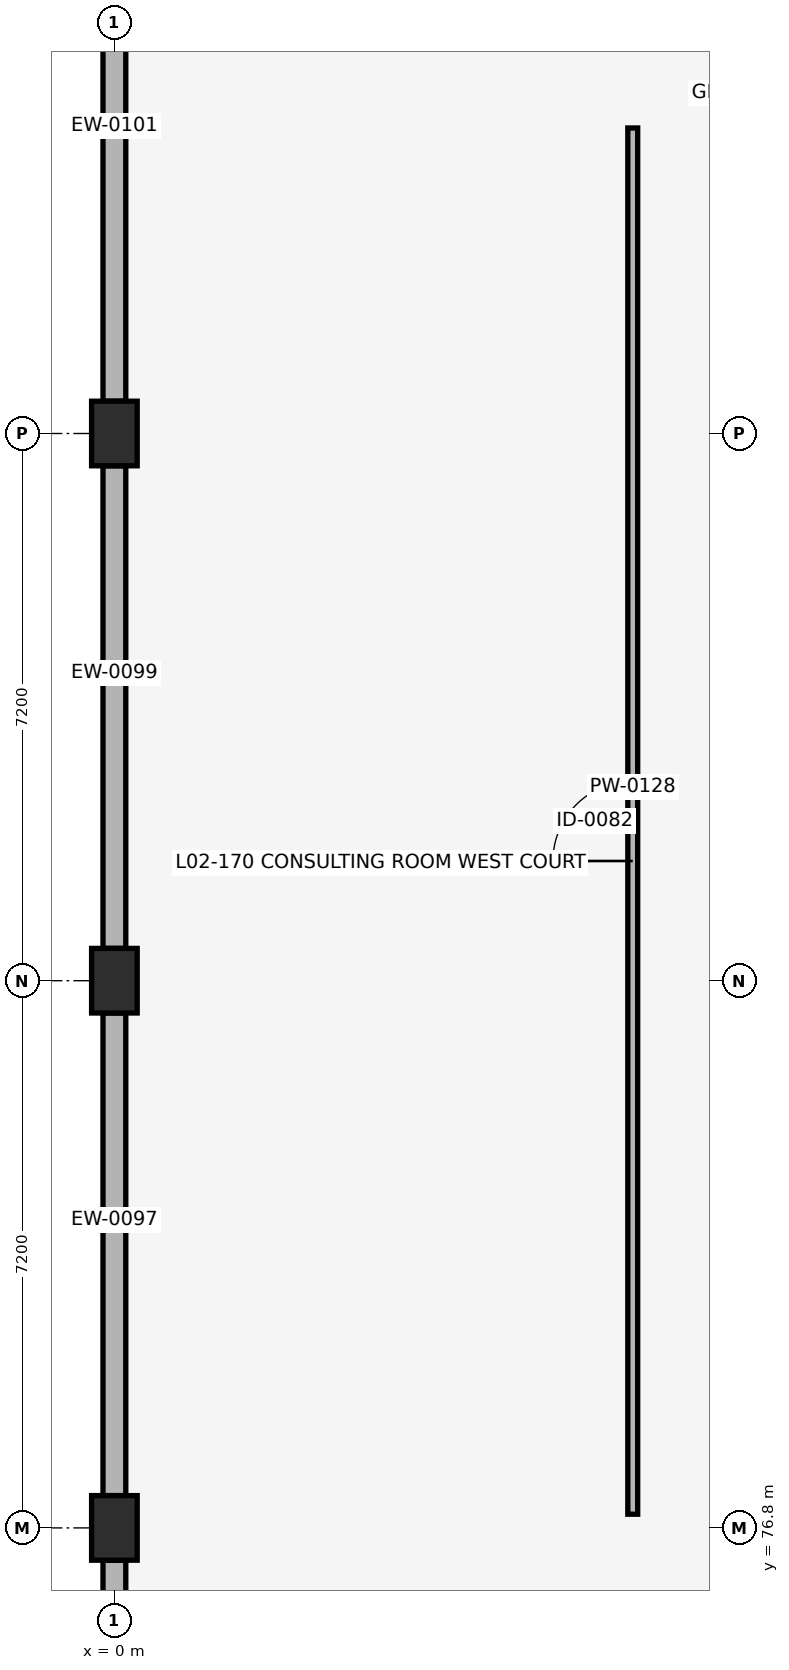
"""IFC4 building model, lengths in metres.
Left out: names, types, materials, properties, quantities, classifications, styles, units other than length and angle.
Written with IfcOpenShell. Run it as: python <this file> out.ifc"""

import sys

from ifc_helpers import new_model, si_unit, direction, frame, frame_2d, origin, origin_2d, place, context, subcontext, project, spatial, rectangle, extrude, element, fill, save


model = new_model("IFC4")
c1 = context("Model", 3, precision=1e-05, world=origin(), true_north=direction((0.0, 1.0)))
c2 = subcontext(c1, "Body", "Model", "MODEL_VIEW")
j1 = project(units=[si_unit("LENGTHUNIT", "METRE"), si_unit("PLANEANGLEUNIT", "RADIAN")], contexts=[c1])
p1 = place(None, origin())
s1 = spatial("IfcSite", under=j1, at=p1, CompositionType="ELEMENT")
p2 = place(p1, origin())
s2 = spatial("IfcBuilding", under=s1, at=p2, CompositionType="ELEMENT")
p3 = place(p2, frame((0.0, 0.0, 8.5)))
s3 = spatial("IfcBuildingStorey", under=s2, at=p3, CompositionType="ELEMENT", Elevation=8.5)
for number, where, z_axis, x_axis in (
    (1, (0.0, 76.8, 0.0), (0.0, 0.0, 1.0), (1.0, 0.0, 0.0)),
    (2, (0.0, 84.0, 0.0), (0.0, 0.0, 1.0), (1.0, 0.0, 0.0)),
    (3, (0.0, 91.2, 0.0), (0.0, 0.0, 1.0), (1.0, 0.0, 0.0)),
):
    element("IfcColumn", number, at=place(p3, frame(where, z_axis=z_axis, x_axis=x_axis)), inside=s3, PredefinedType="COLUMN", context=c2, shape_type="SweptSolid", body=[
        extrude(rectangle(XDim=0.6, YDim=0.85, at=origin_2d()), origin(), (0.0, 0.0, 1.0), 4.08),
    ])
p4 = place(p3, frame((0.0, 76.375, 0.0), z_axis=(0.0, 0.0, 1.0), x_axis=(0.0, -1.0, 0.0)))
e4 = element("IfcWall", 4, at=p4, inside=s3, PredefinedType="SOLIDWALL", context=c2, shape_type="SweptSolid", body=[
    extrude(rectangle(XDim=6.35, YDim=0.3, at=frame_2d((3.175, 0.0))), origin(), (0.0, 0.0, 1.0), 3.08),
])
for number, where, z_axis, x_axis in (
    (5, (0.0, 83.575, 0.0), (0.0, 0.0, 1.0), (0.0, -1.0, 0.0)),
    (6, (0.0, 90.775, 0.0), (0.0, 0.0, 1.0), (0.0, -1.0, 0.0)),
):
    element("IfcWall", number, at=place(p3, frame(where, z_axis=z_axis, x_axis=x_axis)), inside=s3, PredefinedType="SOLIDWALL", context=c2, shape_type="SweptSolid", body=[
        extrude(rectangle(XDim=6.35, YDim=0.3, at=frame_2d((3.175, 0.0))), origin(), (0.0, 0.0, 1.0), 3.08),
    ])
p5 = place(p3, frame((0.0, 97.975, 0.0), z_axis=(0.0, 0.0, 1.0), x_axis=(0.0, -1.0, 0.0)))
e7 = element("IfcWall", 7, at=p5, inside=s3, PredefinedType="SOLIDWALL", context=c2, shape_type="SweptSolid", body=[
    extrude(rectangle(XDim=6.35, YDim=0.3, at=frame_2d((3.175, 0.0))), origin(), (0.0, 0.0, 1.0), 3.08),
])
p6 = place(p3, frame((6.82, 76.98, 0.0), z_axis=(0.0, 0.0, 1.0), x_axis=(0.0, 1.0, 0.0)))
e8 = element("IfcWall", 8, at=p6, inside=s3, PredefinedType="PARTITIONING", context=c2, shape_type="SweptSolid", body=[
    extrude(rectangle(XDim=18.24, YDim=0.13, at=frame_2d((9.12, 0.0))), origin(), (0.0, 0.0, 1.0), 3.12),
])
p7 = place(p6, frame((8.595, 0.0, 0.0)))
e9 = element("IfcOpeningElement", 9, at=p7, cuts=e8, PredefinedType="OPENING", context=c2, shape_type="SweptSolid", body=[
    extrude(rectangle(XDim=1.05, YDim=2.1, at=frame_2d((0.525, 1.05))), frame((0.0, 0.075, 0.0), z_axis=(0.0, -1.0, 0.0), x_axis=(1.0, 0.0, 0.0)), (0.0, 0.0, 1.0), 0.15),
])
p8 = place(p7, origin())
e10 = element("IfcDoor", 10, at=p8, inside=s3, OperationType="SINGLE_SWING_LEFT", PredefinedType="DOOR", context=c2, shape_type="SweptSolid", body=[
    extrude(rectangle(XDim=1.05, YDim=2.1, at=frame_2d((0.525, 1.05))), frame((0.0, 0.025, 0.0), z_axis=(0.0, -1.0, 0.0), x_axis=(1.0, 0.0, 0.0)), (0.0, 0.0, 1.0), 0.05),
])
fill(e9, e10)
save(model, sys.argv[1])
